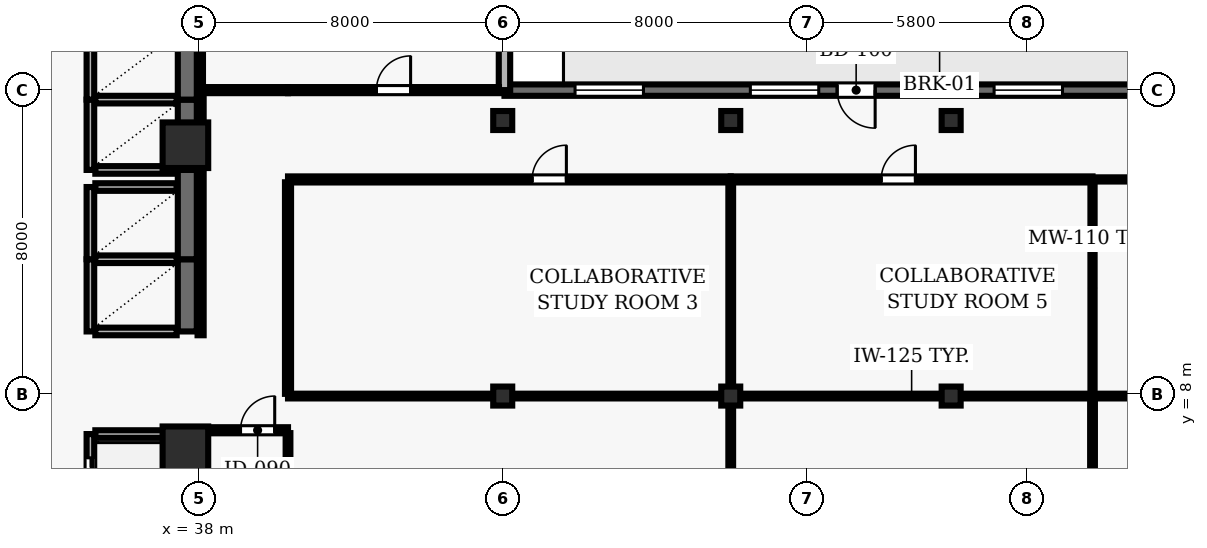
"""IFC4 building model, lengths in metres.
Left out: names, types, materials, properties, quantities, classifications, styles, units other than length and angle.
Written with IfcOpenShell. Run it as: python <this file> out.ifc"""

import sys

from ifc_helpers import new_model, si_unit, direction, frame, frame_2d, origin, origin_2d, place, context, subcontext, project, spatial, rectangle, hollow_rectangle, extrude, element, fill, save


model = new_model("IFC4")
c1 = context("Model", 3, precision=1e-05, world=origin(), true_north=direction((0.0, 1.0)))
c2 = subcontext(c1, "Body", "Model", "MODEL_VIEW")
j1 = project(units=[si_unit("LENGTHUNIT", "METRE"), si_unit("PLANEANGLEUNIT", "RADIAN")], contexts=[c1])
p1 = place(None, origin())
s1 = spatial("IfcSite", under=j1, at=p1, CompositionType="ELEMENT")
p2 = place(p1, origin())
s2 = spatial("IfcBuilding", under=s1, at=p2, CompositionType="ELEMENT")
p3 = place(p2, frame((0.0, 0.0, 142.4)))
s3 = spatial("IfcBuildingStorey", under=s2, at=p3, CompositionType="ELEMENT", Elevation=142.4)
for number, where, z_axis, x_axis in (
    (1, (37.65, 6.55, 0.0), (0.0, 0.0, 1.0), (1.0, 0.0, 0.0)),
    (2, (37.65, 14.55, 0.0), (0.0, 0.0, 1.0), (1.0, 0.0, 0.0)),
):
    element("IfcColumn", number, at=place(p3, frame(where, z_axis=z_axis, x_axis=x_axis)), inside=s3, PredefinedType="COLUMN", context=c2, shape_type="SweptSolid", body=[
        extrude(rectangle(XDim=1.2, YDim=1.2, at=origin_2d()), origin(), (0.0, 0.0, 1.0), 3.9),
    ])
for number, where, z_axis, x_axis in (
    (3, (46.0, 7.95, 0.0), (0.0, 0.0, 1.0), (1.0, 0.0, 0.0)),
    (4, (46.0, 15.2, 0.0), (0.0, 0.0, 1.0), (1.0, 0.0, 0.0)),
    (5, (52.0, 7.95, 0.0), (0.0, 0.0, 1.0), (1.0, 0.0, 0.0)),
    (6, (52.0, 15.2, 0.0), (0.0, 0.0, 1.0), (1.0, 0.0, 0.0)),
    (7, (57.8, 7.95, 0.0), (0.0, 0.0, 1.0), (1.0, 0.0, 0.0)),
    (8, (57.8, 15.2, 0.0), (0.0, 0.0, 1.0), (1.0, 0.0, 0.0)),
):
    element("IfcColumn", number, at=place(p3, frame(where, z_axis=z_axis, x_axis=x_axis)), inside=s3, PredefinedType="COLUMN", context=c2, shape_type="SweptSolid", body=[
        extrude(hollow_rectangle(XDim=0.5, YDim=0.5, WallThickness=0.025, at=origin_2d()), origin(), (0.0, 0.0, 1.0), 3.9),
    ])
p4 = place(p3, frame((68.1, 16.0, 0.0), z_axis=(0.0, 0.0, 1.0), x_axis=(-1.0, 0.0, 0.0)))
e9 = element("IfcWall", 9, at=p4, inside=s3, PredefinedType="SOLIDWALL", context=c2, shape_type="SweptSolid", body=[
    extrude(rectangle(XDim=22.054, YDim=0.3, at=frame_2d((11.027, 0.0))), origin(), (0.0, 0.0, 1.0), 3.69),
])
p5 = place(p4, frame((12.3, 0.0, 0.0)))
e10 = element("IfcOpeningElement", 10, at=p5, cuts=e9, PredefinedType="OPENING", context=c2, shape_type="SweptSolid", body=[
    extrude(rectangle(XDim=1.0, YDim=2.2, at=frame_2d((0.5, 1.1))), frame((0.0, 0.16, 0.0), z_axis=(0.0, -1.0, 0.0), x_axis=(1.0, 0.0, 0.0)), (0.0, 0.0, 1.0), 0.32),
])
p6 = place(p4, frame((1.857, 0.0, 0.9)))
e11 = element("IfcOpeningElement", 11, at=p6, cuts=e9, PredefinedType="OPENING", context=c2, shape_type="SweptSolid", body=[
    extrude(rectangle(XDim=1.8, YDim=1.6, at=frame_2d((0.9, 0.8))), frame((0.0, 0.16, 0.0), z_axis=(0.0, -1.0, 0.0), x_axis=(1.0, 0.0, 0.0)), (0.0, 0.0, 1.0), 0.32),
])
p7 = place(p4, frame((7.37, 0.0, 0.9)))
e12 = element("IfcOpeningElement", 12, at=p7, cuts=e9, PredefinedType="OPENING", context=c2, shape_type="SweptSolid", body=[
    extrude(rectangle(XDim=1.8, YDim=1.6, at=frame_2d((0.9, 0.8))), frame((0.0, 0.16, 0.0), z_axis=(0.0, -1.0, 0.0), x_axis=(1.0, 0.0, 0.0)), (0.0, 0.0, 1.0), 0.32),
])
p8 = place(p4, frame((13.784, 0.0, 0.9)))
e13 = element("IfcOpeningElement", 13, at=p8, cuts=e9, PredefinedType="OPENING", context=c2, shape_type="SweptSolid", body=[
    extrude(rectangle(XDim=1.8, YDim=1.6, at=frame_2d((0.9, 0.8))), frame((0.0, 0.16, 0.0), z_axis=(0.0, -1.0, 0.0), x_axis=(1.0, 0.0, 0.0)), (0.0, 0.0, 1.0), 0.32),
])
p9 = place(p4, frame((18.397, 0.0, 0.9)))
e14 = element("IfcOpeningElement", 14, at=p9, cuts=e9, PredefinedType="OPENING", context=c2, shape_type="SweptSolid", body=[
    extrude(rectangle(XDim=1.8, YDim=1.6, at=frame_2d((0.9, 0.8))), frame((0.0, 0.16, 0.0), z_axis=(0.0, -1.0, 0.0), x_axis=(1.0, 0.0, 0.0)), (0.0, 0.0, 1.0), 0.32),
])
p10 = place(p3, frame((46.046, 16.0, 0.0), z_axis=(0.0, 0.0, 1.0), x_axis=(0.0, 1.0, 0.0)))
e15 = element("IfcWall", 15, at=p10, inside=s3, PredefinedType="SOLIDWALL", context=c2, shape_type="SweptSolid", body=[
    extrude(rectangle(XDim=7.8, YDim=0.3, at=frame_2d((3.9, 0.0))), origin(), (0.0, 0.0, 1.0), 3.69),
])
p11 = place(p10, frame((2.85, 0.0, 0.9)))
e16 = element("IfcOpeningElement", 16, at=p11, cuts=e15, PredefinedType="OPENING", context=c2, shape_type="SweptSolid", body=[
    extrude(rectangle(XDim=2.1, YDim=1.6, at=frame_2d((1.05, 0.8))), frame((0.0, 0.16, 0.0), z_axis=(0.0, -1.0, 0.0), x_axis=(1.0, 0.0, 0.0)), (0.0, 0.0, 1.0), 0.32),
])
p12 = place(p3, frame((35.15, 6.95, 0.0), z_axis=(0.0, 0.0, 1.0), x_axis=(0.0, -1.0, 0.0)))
e17 = element("IfcWall", 17, at=p12, inside=s3, PredefinedType="SOLIDWALL", context=c2, shape_type="SweptSolid", body=[
    extrude(rectangle(XDim=2.25, YDim=0.2, at=frame_2d((1.125, 0.0))), origin(), (0.0, 0.0, 1.0), 3.69),
])
p13 = place(p12, frame((0.625, 0.0, 0.0)))
e18 = element("IfcOpeningElement", 18, at=p13, cuts=e17, PredefinedType="OPENING", context=c2, shape_type="SweptSolid", body=[
    extrude(rectangle(XDim=1.0, YDim=2.1, at=frame_2d((0.5, 1.05))), frame((0.0, 0.11, 0.0), z_axis=(0.0, -1.0, 0.0), x_axis=(1.0, 0.0, 0.0)), (0.0, 0.0, 1.0), 0.22),
])
p14 = place(p3, frame((37.7, 4.7, 0.0), z_axis=(0.0, 0.0, 1.0), x_axis=(0.0, 1.0, 0.0)))
e19 = element("IfcWall", 19, at=p14, inside=s3, PredefinedType="SHEAR", context=c2, shape_type="SweptSolid", body=[
    extrude(rectangle(XDim=2.25, YDim=0.5, at=frame_2d((1.125, 0.0))), origin(), (0.0, 0.0, 1.0), 3.69),
])
p15 = place(p3, frame((37.42, 6.95, 0.0), z_axis=(0.0, 0.0, 1.0), x_axis=(-1.0, 0.0, 0.0)))
e20 = element("IfcWall", 20, at=p15, inside=s3, PredefinedType="SOLIDWALL", context=c2, shape_type="SweptSolid", body=[
    extrude(rectangle(XDim=2.14, YDim=0.2, at=frame_2d((1.07, 0.0))), origin(), (0.0, 0.0, 1.0), 3.69),
])
p16 = place(p3, frame((35.15, 11.55, 0.0), z_axis=(0.0, 0.0, 1.0), x_axis=(0.0, -1.0, 0.0)))
e21 = element("IfcWall", 21, at=p16, inside=s3, PredefinedType="SOLIDWALL", context=c2, shape_type="SweptSolid", body=[
    extrude(rectangle(XDim=1.9, YDim=0.2, at=frame_2d((0.95, 0.0))), origin(), (0.0, 0.0, 1.0), 3.69),
])
p17 = place(p3, frame((37.7, 9.65, 0.0), z_axis=(0.0, 0.0, 1.0), x_axis=(0.0, 1.0, 0.0)))
e22 = element("IfcWall", 22, at=p17, inside=s3, PredefinedType="SHEAR", context=c2, shape_type="SweptSolid", body=[
    extrude(rectangle(XDim=1.9, YDim=0.5, at=frame_2d((0.95, 0.0))), origin(), (0.0, 0.0, 1.0), 3.69),
])
for number, where, z_axis, x_axis in (
    (23, (35.28, 9.65, 0.0), (0.0, 0.0, 1.0), (1.0, 0.0, 0.0)),
    (24, (37.42, 11.55, 0.0), (0.0, 0.0, 1.0), (-1.0, 0.0, 0.0)),
):
    element("IfcWall", number, at=place(p3, frame(where, z_axis=z_axis, x_axis=x_axis)), inside=s3, PredefinedType="SOLIDWALL", context=c2, shape_type="SweptSolid", body=[
        extrude(rectangle(XDim=2.14, YDim=0.2, at=frame_2d((1.07, 0.0))), origin(), (0.0, 0.0, 1.0), 3.69),
    ])
p18 = place(p3, frame((35.15, 13.45, 0.0), z_axis=(0.0, 0.0, 1.0), x_axis=(0.0, -1.0, 0.0)))
e25 = element("IfcWall", 25, at=p18, inside=s3, PredefinedType="SOLIDWALL", context=c2, shape_type="SweptSolid", body=[
    extrude(rectangle(XDim=1.9, YDim=0.2, at=frame_2d((0.95, 0.0))), origin(), (0.0, 0.0, 1.0), 3.69),
])
p19 = place(p3, frame((37.7, 11.55, 0.0), z_axis=(0.0, 0.0, 1.0), x_axis=(0.0, 1.0, 0.0)))
e26 = element("IfcWall", 26, at=p19, inside=s3, PredefinedType="SHEAR", context=c2, shape_type="SweptSolid", body=[
    extrude(rectangle(XDim=2.35, YDim=0.5, at=frame_2d((1.175, 0.0))), origin(), (0.0, 0.0, 1.0), 3.69),
])
p20 = place(p3, frame((37.42, 13.45, 0.0), z_axis=(0.0, 0.0, 1.0), x_axis=(-1.0, 0.0, 0.0)))
e27 = element("IfcWall", 27, at=p20, inside=s3, PredefinedType="SOLIDWALL", context=c2, shape_type="SweptSolid", body=[
    extrude(rectangle(XDim=2.14, YDim=0.2, at=frame_2d((1.07, 0.0))), origin(), (0.0, 0.0, 1.0), 3.69),
])
p21 = place(p3, frame((35.15, 15.75, 0.0), z_axis=(0.0, 0.0, 1.0), x_axis=(0.0, -1.0, 0.0)))
e28 = element("IfcWall", 28, at=p21, inside=s3, PredefinedType="SOLIDWALL", context=c2, shape_type="SweptSolid", body=[
    extrude(rectangle(XDim=1.85, YDim=0.2, at=frame_2d((0.925, 0.0))), origin(), (0.0, 0.0, 1.0), 3.69),
])
p22 = place(p3, frame((37.7, 13.9, 0.0), z_axis=(0.0, 0.0, 1.0), x_axis=(0.0, 1.0, 0.0)))
e29 = element("IfcWall", 29, at=p22, inside=s3, PredefinedType="SHEAR", context=c2, shape_type="SweptSolid", body=[
    extrude(rectangle(XDim=1.85, YDim=0.5, at=frame_2d((0.925, 0.0))), origin(), (0.0, 0.0, 1.0), 3.69),
])
for number, where, z_axis, x_axis in (
    (30, (35.28, 13.9, 0.0), (0.0, 0.0, 1.0), (1.0, 0.0, 0.0)),
    (31, (37.42, 15.75, 0.0), (0.0, 0.0, 1.0), (-1.0, 0.0, 0.0)),
):
    element("IfcWall", number, at=place(p3, frame(where, z_axis=z_axis, x_axis=x_axis)), inside=s3, PredefinedType="SOLIDWALL", context=c2, shape_type="SweptSolid", body=[
        extrude(rectangle(XDim=2.14, YDim=0.2, at=frame_2d((1.07, 0.0))), origin(), (0.0, 0.0, 1.0), 3.69),
    ])
p23 = place(p3, frame((35.15, 17.6, 0.0), z_axis=(0.0, 0.0, 1.0), x_axis=(0.0, -1.0, 0.0)))
e32 = element("IfcWall", 32, at=p23, inside=s3, PredefinedType="SOLIDWALL", context=c2, shape_type="SweptSolid", body=[
    extrude(rectangle(XDim=1.85, YDim=0.2, at=frame_2d((0.925, 0.0))), origin(), (0.0, 0.0, 1.0), 3.69),
])
p24 = place(p3, frame((37.7, 15.75, 0.0), z_axis=(0.0, 0.0, 1.0), x_axis=(0.0, 1.0, 0.0)))
e33 = element("IfcWall", 33, at=p24, inside=s3, PredefinedType="SHEAR", context=c2, shape_type="SweptSolid", body=[
    extrude(rectangle(XDim=1.85, YDim=0.5, at=frame_2d((0.925, 0.0))), origin(), (0.0, 0.0, 1.0), 3.69),
])
p25 = place(p3, frame((38.05, 7.05, 0.0), z_axis=(0.0, 0.0, 1.0), x_axis=(1.0, 0.0, 0.0)))
e34 = element("IfcWall", 34, at=p25, inside=s3, PredefinedType="PARTITIONING", context=c2, shape_type="SweptSolid", body=[
    extrude(rectangle(XDim=2.3, YDim=0.16, at=frame_2d((1.15, 0.0))), origin(), (0.0, 0.0, 1.0), 3.69),
])
p26 = place(p25, frame((1.05, 0.0, 0.0)))
e35 = element("IfcOpeningElement", 35, at=p26, cuts=e34, PredefinedType="OPENING", context=c2, shape_type="SweptSolid", body=[
    extrude(rectangle(XDim=0.9, YDim=2.1, at=frame_2d((0.45, 1.05))), frame((0.0, 0.09, 0.0), z_axis=(0.0, -1.0, 0.0), x_axis=(1.0, 0.0, 0.0)), (0.0, 0.0, 1.0), 0.18),
])
p27 = place(p3, frame((40.35, 13.65, 0.0), z_axis=(0.0, 0.0, 1.0), x_axis=(1.0, 0.0, 0.0)))
e36 = element("IfcWall", 36, at=p27, inside=s3, PredefinedType="PARTITIONING", context=c2, shape_type="SweptSolid", body=[
    extrude(rectangle(XDim=11.65, YDim=0.16, at=frame_2d((5.825, 0.0))), origin(), (0.0, 0.0, 1.0), 3.69),
])
p28 = place(p27, frame((6.425, 0.0, 0.0)))
e37 = element("IfcOpeningElement", 37, at=p28, cuts=e36, PredefinedType="OPENING", context=c2, shape_type="SweptSolid", body=[
    extrude(rectangle(XDim=0.9, YDim=2.1, at=frame_2d((0.45, 1.05))), frame((0.0, 0.09, 0.0), z_axis=(0.0, -1.0, 0.0), x_axis=(1.0, 0.0, 0.0)), (0.0, 0.0, 1.0), 0.18),
])
p29 = place(p3, frame((40.35, 16.0, 0.0), z_axis=(0.0, 0.0, 1.0), x_axis=(-1.0, 0.0, 0.0)))
e38 = element("IfcWall", 38, at=p29, inside=s3, PredefinedType="PARTITIONING", context=c2, shape_type="SweptSolid", body=[
    extrude(rectangle(XDim=2.3, YDim=0.16, at=frame_2d((1.15, 0.0))), origin(), (0.0, 0.0, 1.0), 3.69),
])
p30 = place(p3, frame((40.35, 16.0, 0.0), z_axis=(0.0, 0.0, 1.0), x_axis=(1.0, 0.0, 0.0)))
e39 = element("IfcWall", 39, at=p30, inside=s3, PredefinedType="PARTITIONING", context=c2, shape_type="SweptSolid", body=[
    extrude(rectangle(XDim=5.551, YDim=0.16, at=frame_2d((2.775, 0.0))), origin(), (0.0, 0.0, 1.0), 3.69),
])
p31 = place(p30, frame((2.326, 0.0, 0.0)))
e40 = element("IfcOpeningElement", 40, at=p31, cuts=e39, PredefinedType="OPENING", context=c2, shape_type="SweptSolid", body=[
    extrude(rectangle(XDim=0.9, YDim=2.1, at=frame_2d((0.45, 1.05))), frame((0.0, 0.09, 0.0), z_axis=(0.0, -1.0, 0.0), x_axis=(1.0, 0.0, 0.0)), (0.0, 0.0, 1.0), 0.18),
])
p32 = place(p3, frame((52.0, 7.95, 0.0), z_axis=(0.0, 0.0, 1.0), x_axis=(-1.0, 0.0, 0.0)))
e41 = element("IfcWall", 41, at=p32, inside=s3, PredefinedType="PARTITIONING", context=c2, shape_type="SweptSolid", body=[
    extrude(rectangle(XDim=11.65, YDim=0.125, at=frame_2d((5.825, 0.0))), origin(), (0.0, 0.0, 1.0), 3.074),
])
p33 = place(p3, frame((52.0, 13.65, 0.0), z_axis=(0.0, 0.0, 1.0), x_axis=(1.0, 0.0, 0.0)))
e42 = element("IfcWall", 42, at=p33, inside=s3, PredefinedType="PARTITIONING", context=c2, shape_type="SweptSolid", body=[
    extrude(rectangle(XDim=9.52, YDim=0.16, at=frame_2d((4.76, 0.0))), origin(), (0.0, 0.0, 1.0), 3.69),
])
p34 = place(p33, frame((3.96, 0.0, 0.0)))
e43 = element("IfcOpeningElement", 43, at=p34, cuts=e42, PredefinedType="OPENING", context=c2, shape_type="SweptSolid", body=[
    extrude(rectangle(XDim=0.9, YDim=2.1, at=frame_2d((0.45, 1.05))), frame((0.0, 0.09, 0.0), z_axis=(0.0, -1.0, 0.0), x_axis=(1.0, 0.0, 0.0)), (0.0, 0.0, 1.0), 0.18),
])
p35 = place(p3, frame((61.52, 7.95, 0.0), z_axis=(0.0, 0.0, 1.0), x_axis=(-1.0, 0.0, 0.0)))
e44 = element("IfcWall", 44, at=p35, inside=s3, PredefinedType="PARTITIONING", context=c2, shape_type="SweptSolid", body=[
    extrude(rectangle(XDim=9.52, YDim=0.125, at=frame_2d((4.76, 0.0))), origin(), (0.0, 0.0, 1.0), 3.074),
])
p36 = place(p3, frame((61.52, 13.65, 0.0), z_axis=(0.0, 0.0, 1.0), x_axis=(1.0, 0.0, 0.0)))
e45 = element("IfcWall", 45, at=p36, inside=s3, PredefinedType="MOVABLE", context=c2, shape_type="SweptSolid", body=[
    extrude(rectangle(XDim=8.725, YDim=0.11, at=frame_2d((4.363, 0.0))), origin(), (0.0, 0.0, 1.0), 3.69),
])
p37 = place(p36, frame((3.913, 0.0, 0.0)))
e46 = element("IfcOpeningElement", 46, at=p37, cuts=e45, PredefinedType="OPENING", context=c2, shape_type="SweptSolid", body=[
    extrude(rectangle(XDim=0.9, YDim=2.1, at=frame_2d((0.45, 1.05))), frame((0.0, 0.065, 0.0), z_axis=(0.0, -1.0, 0.0), x_axis=(1.0, 0.0, 0.0)), (0.0, 0.0, 1.0), 0.13),
])
p38 = place(p3, frame((70.455, 7.95, 0.0), z_axis=(0.0, 0.0, 1.0), x_axis=(-1.0, 0.0, 0.0)))
e47 = element("IfcWall", 47, at=p38, inside=s3, PredefinedType="PARTITIONING", context=c2, shape_type="SweptSolid", body=[
    extrude(rectangle(XDim=8.935, YDim=0.125, at=frame_2d((4.468, 0.0))), origin(), (0.0, 0.0, 1.0), 3.69),
])
p39 = place(p3, frame((38.05, 6.975, 0.0), z_axis=(0.0, 0.0, 1.0), x_axis=(0.0, -1.0, 0.0)))
e48 = element("IfcWall", 48, at=p39, inside=s3, PredefinedType="PARTITIONING", context=c2, shape_type="SweptSolid", body=[
    extrude(rectangle(XDim=6.83, YDim=0.125, at=frame_2d((3.415, 0.0))), origin(), (0.0, 0.0, 1.0), 3.074),
])
p40 = place(p3, frame((38.05, 15.925, 0.0), z_axis=(0.0, 0.0, 1.0), x_axis=(0.0, -1.0, 0.0)))
e49 = element("IfcWall", 49, at=p40, inside=s3, PredefinedType="PARTITIONING", context=c2, shape_type="SweptSolid", body=[
    extrude(rectangle(XDim=6.375, YDim=0.16, at=frame_2d((3.188, 0.0))), origin(), (0.0, 0.0, 1.0), 3.074),
])
p41 = place(p3, frame((38.05, 24.0, 0.0), z_axis=(0.0, 0.0, 1.0), x_axis=(0.0, -1.0, 0.0)))
e50 = element("IfcWall", 50, at=p41, inside=s3, PredefinedType="PARTITIONING", context=c2, shape_type="SweptSolid", body=[
    extrude(rectangle(XDim=7.925, YDim=0.125, at=frame_2d((3.962, 0.0))), origin(), (0.0, 0.0, 1.0), 3.074),
])
p42 = place(p3, frame((40.35, 0.09, 0.0), z_axis=(0.0, 0.0, 1.0), x_axis=(0.0, 1.0, 0.0)))
e51 = element("IfcWall", 51, at=p42, inside=s3, PredefinedType="PARTITIONING", context=c2, shape_type="SweptSolid", body=[
    extrude(rectangle(XDim=6.885, YDim=0.125, at=frame_2d((3.442, 0.0))), origin(), (0.0, 0.0, 1.0), 3.69),
])
p43 = place(p42, frame((2.992, 0.0, 0.0)))
e52 = element("IfcOpeningElement", 52, at=p43, cuts=e51, PredefinedType="OPENING", context=c2, shape_type="SweptSolid", body=[
    extrude(rectangle(XDim=0.9, YDim=2.1, at=frame_2d((0.45, 1.05))), frame((0.0, 0.073, 0.0), z_axis=(0.0, -1.0, 0.0), x_axis=(1.0, 0.0, 0.0)), (0.0, 0.0, 1.0), 0.145),
])
p44 = place(p3, frame((40.35, 8.008, 0.0), z_axis=(0.0, 0.0, 1.0), x_axis=(0.0, 1.0, 0.0)))
e53 = element("IfcWall", 53, at=p44, inside=s3, PredefinedType="PARTITIONING", context=c2, shape_type="SweptSolid", body=[
    extrude(rectangle(XDim=5.567, YDim=0.16, at=frame_2d((2.783, 0.0))), origin(), (0.0, 0.0, 1.0), 3.69),
])
p45 = place(p3, frame((52.0, 0.145, 0.0), z_axis=(0.0, 0.0, 1.0), x_axis=(0.0, 1.0, 0.0)))
e54 = element("IfcWall", 54, at=p45, inside=s3, PredefinedType="PARTITIONING", context=c2, shape_type="SweptSolid", body=[
    extrude(rectangle(XDim=7.748, YDim=0.125, at=frame_2d((3.874, 0.0))), origin(), (0.0, 0.0, 1.0), 3.074),
])
p46 = place(p45, frame((3.424, 0.0, 0.0)))
e55 = element("IfcOpeningElement", 55, at=p46, cuts=e54, PredefinedType="OPENING", context=c2, shape_type="SweptSolid", body=[
    extrude(rectangle(XDim=0.9, YDim=2.1, at=frame_2d((0.45, 1.05))), frame((0.0, 0.073, 0.0), z_axis=(0.0, -1.0, 0.0), x_axis=(1.0, 0.0, 0.0)), (0.0, 0.0, 1.0), 0.145),
])
p47 = place(p3, frame((52.0, 8.008, 0.0), z_axis=(0.0, 0.0, 1.0), x_axis=(0.0, 1.0, 0.0)))
e56 = element("IfcWall", 56, at=p47, inside=s3, PredefinedType="PARTITIONING", context=c2, shape_type="SweptSolid", body=[
    extrude(rectangle(XDim=5.567, YDim=0.125, at=frame_2d((2.783, 0.0))), origin(), (0.0, 0.0, 1.0), 3.074),
])
p48 = place(p3, frame((61.52, 0.09, 0.0), z_axis=(0.0, 0.0, 1.0), x_axis=(0.0, 1.0, 0.0)))
e57 = element("IfcWall", 57, at=p48, inside=s3, PredefinedType="PARTITIONING", context=c2, shape_type="SweptSolid", body=[
    extrude(rectangle(XDim=7.803, YDim=0.125, at=frame_2d((3.901, 0.0))), origin(), (0.0, 0.0, 1.0), 3.69),
])
p49 = place(p48, frame((3.401, 0.0, 0.0)))
e58 = element("IfcOpeningElement", 58, at=p49, cuts=e57, PredefinedType="OPENING", context=c2, shape_type="SweptSolid", body=[
    extrude(rectangle(XDim=1.0, YDim=2.1, at=frame_2d((0.5, 1.05))), frame((0.0, 0.073, 0.0), z_axis=(0.0, -1.0, 0.0), x_axis=(1.0, 0.0, 0.0)), (0.0, 0.0, 1.0), 0.145),
])
p50 = place(p3, frame((61.52, 8.008, 0.0), z_axis=(0.0, 0.0, 1.0), x_axis=(0.0, 1.0, 0.0)))
e59 = element("IfcWall", 59, at=p50, inside=s3, PredefinedType="MOVABLE", context=c2, shape_type="SweptSolid", body=[
    extrude(rectangle(XDim=5.567, YDim=0.11, at=frame_2d((2.783, 0.0))), origin(), (0.0, 0.0, 1.0), 3.69),
])
p51 = place(p5, origin())
e60 = element("IfcDoor", 60, at=p51, inside=s3, OperationType="SINGLE_SWING_LEFT", PredefinedType="DOOR", context=c2, shape_type="SweptSolid", body=[
    extrude(rectangle(XDim=1.0, YDim=2.2, at=frame_2d((0.5, 1.1))), frame((0.0, 0.025, 0.0), z_axis=(0.0, -1.0, 0.0), x_axis=(1.0, 0.0, 0.0)), (0.0, 0.0, 1.0), 0.05),
])
fill(e10, e60)
p52 = place(p7, origin())
e61 = element("IfcWindow", 61, at=p52, inside=s3, PartitioningType="SINGLE_PANEL", PredefinedType="WINDOW", context=c2, shape_type="SweptSolid", body=[
    extrude(rectangle(XDim=1.8, YDim=1.6, at=frame_2d((0.9, 0.8))), frame((0.0, 0.03, 0.0), z_axis=(0.0, -1.0, 0.0), x_axis=(1.0, 0.0, 0.0)), (0.0, 0.0, 1.0), 0.06),
])
fill(e12, e61)
p53 = place(p8, origin())
e62 = element("IfcWindow", 62, at=p53, inside=s3, PartitioningType="SINGLE_PANEL", PredefinedType="WINDOW", context=c2, shape_type="SweptSolid", body=[
    extrude(rectangle(XDim=1.8, YDim=1.6, at=frame_2d((0.9, 0.8))), frame((0.0, 0.03, 0.0), z_axis=(0.0, -1.0, 0.0), x_axis=(1.0, 0.0, 0.0)), (0.0, 0.0, 1.0), 0.06),
])
fill(e13, e62)
p54 = place(p9, origin())
e63 = element("IfcWindow", 63, at=p54, inside=s3, PartitioningType="SINGLE_PANEL", PredefinedType="WINDOW", context=c2, shape_type="SweptSolid", body=[
    extrude(rectangle(XDim=1.8, YDim=1.6, at=frame_2d((0.9, 0.8))), frame((0.0, 0.03, 0.0), z_axis=(0.0, -1.0, 0.0), x_axis=(1.0, 0.0, 0.0)), (0.0, 0.0, 1.0), 0.06),
])
fill(e14, e63)
p55 = place(p13, origin())
e64 = element("IfcDoor", 64, at=p55, inside=s3, OperationType="DOUBLE_DOOR_SLIDING", PredefinedType="DOOR", context=c2, shape_type="SweptSolid", body=[
    extrude(rectangle(XDim=1.0, YDim=2.1, at=frame_2d((0.5, 1.05))), frame((0.0, 0.025, 0.0), z_axis=(0.0, -1.0, 0.0), x_axis=(1.0, 0.0, 0.0)), (0.0, 0.0, 1.0), 0.05),
])
fill(e18, e64)
p56 = place(p26, origin())
e65 = element("IfcDoor", 65, at=p56, inside=s3, OperationType="SINGLE_SWING_RIGHT", PredefinedType="DOOR", context=c2, shape_type="SweptSolid", body=[
    extrude(rectangle(XDim=0.9, YDim=2.1, at=frame_2d((0.45, 1.05))), frame((0.0, 0.025, 0.0), z_axis=(0.0, -1.0, 0.0), x_axis=(1.0, 0.0, 0.0)), (0.0, 0.0, 1.0), 0.05),
])
fill(e35, e65)
p57 = place(p28, origin())
e66 = element("IfcDoor", 66, at=p57, inside=s3, OperationType="SINGLE_SWING_RIGHT", PredefinedType="DOOR", context=c2, shape_type="SweptSolid", body=[
    extrude(rectangle(XDim=0.9, YDim=2.1, at=frame_2d((0.45, 1.05))), frame((0.0, 0.025, 0.0), z_axis=(0.0, -1.0, 0.0), x_axis=(1.0, 0.0, 0.0)), (0.0, 0.0, 1.0), 0.05),
])
fill(e37, e66)
p58 = place(p34, origin())
e67 = element("IfcDoor", 67, at=p58, inside=s3, OperationType="SINGLE_SWING_RIGHT", PredefinedType="DOOR", context=c2, shape_type="SweptSolid", body=[
    extrude(rectangle(XDim=0.9, YDim=2.1, at=frame_2d((0.45, 1.05))), frame((0.0, 0.025, 0.0), z_axis=(0.0, -1.0, 0.0), x_axis=(1.0, 0.0, 0.0)), (0.0, 0.0, 1.0), 0.05),
])
fill(e43, e67)
p59 = place(p31, origin())
e68 = element("IfcDoor", 68, at=p59, inside=s3, OperationType="SINGLE_SWING_RIGHT", PredefinedType="DOOR", context=c2, shape_type="SweptSolid", body=[
    extrude(rectangle(XDim=0.9, YDim=2.1, at=frame_2d((0.45, 1.05))), frame((0.0, 0.025, 0.0), z_axis=(0.0, -1.0, 0.0), x_axis=(1.0, 0.0, 0.0)), (0.0, 0.0, 1.0), 0.05),
])
fill(e40, e68)
save(model, sys.argv[1])
